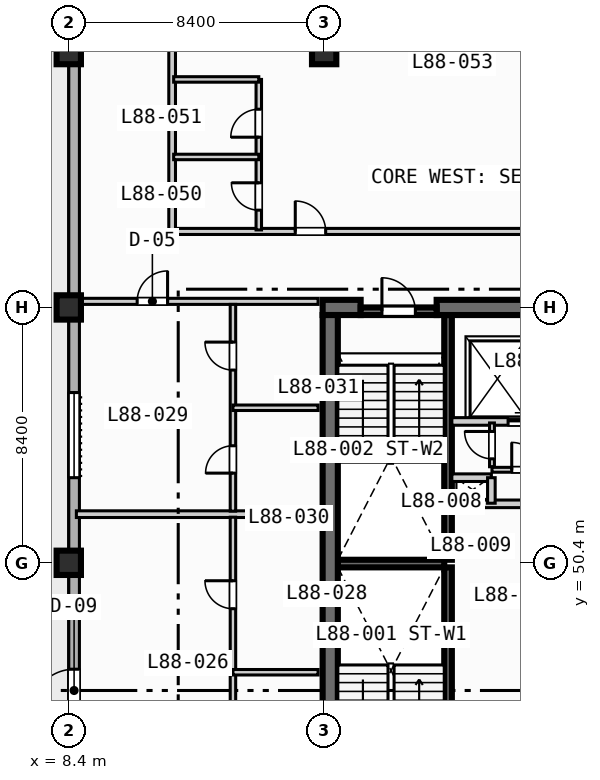
"""IFC4 building model, lengths in metres.
Left out: names, types, materials, properties, quantities, classifications, styles, units other than length and angle.
Written with IfcOpenShell. Run it as: python <this file> out.ifc"""

import sys

from ifc_helpers import new_model, si_unit, direction, frame, frame_2d, origin, origin_2d, place, context, subcontext, project, spatial, rectangle, extrude, element, fill, save


model = new_model("IFC4")
c1 = context("Model", 3, precision=1e-05, world=origin(), true_north=direction((0.0, 1.0)))
c2 = subcontext(c1, "Body", "Model", "MODEL_VIEW")
j1 = project(units=[si_unit("LENGTHUNIT", "METRE"), si_unit("PLANEANGLEUNIT", "RADIAN")], contexts=[c1])
p1 = place(None, origin())
s1 = spatial("IfcSite", under=j1, at=p1, CompositionType="ELEMENT")
p2 = place(p1, origin())
s2 = spatial("IfcBuilding", under=s1, at=p2, CompositionType="ELEMENT")
p3 = place(p2, frame((0.0, 0.0, 355.4)))
s3 = spatial("IfcBuildingStorey", under=s2, at=p3, CompositionType="ELEMENT", Elevation=355.4)
for number, where, z_axis, x_axis in (
    (1, (20.875, 42.2, 0.0), (0.0, 0.0, 1.0), (0.0, 1.0, 0.0)),
    (2, (20.875, 50.5, 0.0), (0.0, 0.0, 1.0), (0.0, 1.0, 0.0)),
):
    element("IfcWall", number, at=place(p3, frame(where, z_axis=z_axis, x_axis=x_axis)), inside=s3, PredefinedType="SOLIDWALL", context=c2, shape_type="SweptSolid", body=[
        extrude(rectangle(XDim=8.05, YDim=0.25, at=frame_2d((4.025, 0.0))), origin(), (0.0, 0.0, 1.0), 3.97),
    ])
p4 = place(p3, frame((17.25, 50.375, 0.0), z_axis=(0.0, 0.0, 1.0), x_axis=(1.0, 0.0, 0.0)))
e3 = element("IfcWall", 3, at=p4, inside=s3, PredefinedType="SOLIDWALL", context=c2, shape_type="SweptSolid", body=[
    extrude(rectangle(XDim=3.5, YDim=0.25, at=frame_2d((1.75, 0.0))), origin(), (0.0, 0.0, 1.0), 3.97),
])
p5 = place(p3, frame((16.75, 58.8, 0.0), z_axis=(0.0, 0.0, 1.0), x_axis=(1.0, 0.0, 0.0)))
e4 = element("IfcWall", 4, at=p5, inside=s3, PredefinedType="SHEAR", context=c2, shape_type="SweptSolid", body=[
    extrude(rectangle(XDim=1.25, YDim=0.5, at=frame_2d((0.625, 0.0))), origin(), (0.0, 0.0, 1.0), 3.97),
])
p6 = place(p3, frame((20.5, 58.8, 0.0), z_axis=(0.0, 0.0, 1.0), x_axis=(1.0, 0.0, 0.0)))
e5 = element("IfcWall", 5, at=p6, inside=s3, PredefinedType="SHEAR", context=c2, shape_type="SweptSolid", body=[
    extrude(rectangle(XDim=4.95, YDim=0.5, at=frame_2d((2.475, 0.0))), origin(), (0.0, 0.0, 1.0), 3.97),
])
p7 = place(p3, frame((17.0, 42.2, 0.0), z_axis=(0.0, 0.0, 1.0), x_axis=(0.0, 1.0, 0.0)))
e6 = element("IfcWall", 6, at=p7, inside=s3, PredefinedType="SHEAR", context=c2, shape_type="SweptSolid", body=[
    extrude(rectangle(XDim=16.35, YDim=0.5, at=frame_2d((8.175, 0.0))), origin(), (0.0, 0.0, 1.0), 3.97),
])
for number, where, z_axis, x_axis in (
    (7, (8.4, 50.4, 0.0), (0.0, 0.0, 1.0), (1.0, 0.0, 0.0)),
    (8, (8.4, 58.8, 0.0), (0.0, 0.0, 1.0), (1.0, 0.0, 0.0)),
    (9, (8.4, 67.2, 0.0), (0.0, 0.0, 1.0), (1.0, 0.0, 0.0)),
    (10, (16.8, 67.2, 0.0), (0.0, 0.0, 1.0), (1.0, 0.0, 0.0)),
):
    element("IfcColumn", number, at=place(p3, frame(where, z_axis=z_axis, x_axis=x_axis)), inside=s3, PredefinedType="COLUMN", context=c2, shape_type="SweptSolid", body=[
        extrude(rectangle(XDim=0.8, YDim=0.8, at=origin_2d()), origin(), (0.0, 0.0, 1.0), 4.2),
    ])
p8 = place(p3, frame((8.575, 11.575, 0.0), z_axis=(0.0, 0.0, 1.0), x_axis=(0.0, 1.0, 0.0)))
e11 = element("IfcWall", 11, at=p8, inside=s3, PredefinedType="STANDARD", context=c2, shape_type="SweptSolid", body=[
    extrude(rectangle(XDim=60.85, YDim=0.35, at=frame_2d((30.425, 0.0))), origin(), (0.0, 0.0, 1.0), 3.97),
])
p9 = place(p8, frame((33.925, 0.0, 0.0)))
e12 = element("IfcOpeningElement", 12, at=p9, cuts=e11, PredefinedType="OPENING", context=c2, shape_type="SweptSolid", body=[
    extrude(rectangle(XDim=1.4, YDim=2.2, at=frame_2d((0.7, 1.1))), frame((0.0, 0.185, 0.0), z_axis=(0.0, -1.0, 0.0), x_axis=(1.0, 0.0, 0.0)), (0.0, 0.0, 1.0), 0.37),
])
p10 = place(p8, frame((24.825, 0.0, 0.85)))
e13 = element("IfcOpeningElement", 13, at=p10, cuts=e11, PredefinedType="OPENING", context=c2, shape_type="SweptSolid", body=[
    extrude(rectangle(XDim=2.8, YDim=2.1, at=frame_2d((1.4, 1.05))), frame((0.0, 0.185, 0.0), z_axis=(0.0, -1.0, 0.0), x_axis=(1.0, 0.0, 0.0)), (0.0, 0.0, 1.0), 0.37),
])
p11 = place(p8, frame((41.625, 0.0, 0.85)))
e14 = element("IfcOpeningElement", 14, at=p11, cuts=e11, PredefinedType="OPENING", context=c2, shape_type="SweptSolid", body=[
    extrude(rectangle(XDim=2.8, YDim=2.1, at=frame_2d((1.4, 1.05))), frame((0.0, 0.185, 0.0), z_axis=(0.0, -1.0, 0.0), x_axis=(1.0, 0.0, 0.0)), (0.0, 0.0, 1.0), 0.37),
])
p12 = place(p8, frame((19.25, 0.0, 0.85)))
e15 = element("IfcOpeningElement", 15, at=p12, cuts=e11, PredefinedType="OPENING", context=c2, shape_type="SweptSolid", body=[
    extrude(rectangle(XDim=1.8, YDim=1.8, at=frame_2d((0.9, 0.9))), frame((0.0, 0.185, 0.0), z_axis=(0.0, -1.0, 0.0), x_axis=(1.0, 0.0, 0.0)), (0.0, 0.0, 1.0), 0.37),
])
p13 = place(p3, frame((18.0, 58.675, 0.0), z_axis=(0.0, 0.0, 1.0), x_axis=(1.0, 0.0, 0.0)))
e16 = element("IfcWall", 16, at=p13, inside=s3, PredefinedType="SOLIDWALL", context=c2, shape_type="SweptSolid", body=[
    extrude(rectangle(XDim=2.5, YDim=0.25, at=frame_2d((1.25, 0.0))), origin(), (0.0, 0.0, 1.0), 3.97),
])
p14 = place(p13, frame((0.7, 0.0, 0.0)))
e17 = element("IfcOpeningElement", 17, at=p14, cuts=e16, PredefinedType="OPENING", context=c2, shape_type="SweptSolid", body=[
    extrude(rectangle(XDim=1.1, YDim=2.15, at=frame_2d((0.55, 1.075))), frame((0.0, 0.135, 0.0), z_axis=(0.0, -1.0, 0.0), x_axis=(1.0, 0.0, 0.0)), (0.0, 0.0, 1.0), 0.27),
])
p15 = place(p3, frame((21.0, 52.34, 0.0), z_axis=(0.0, 0.0, 1.0), x_axis=(1.0, 0.0, 0.0)))
e18 = element("IfcWall", 18, at=p15, inside=s3, PredefinedType="SOLIDWALL", context=c2, shape_type="SweptSolid", body=[
    extrude(rectangle(XDim=3.95, YDim=0.25, at=frame_2d((1.975, 0.0))), origin(), (0.0, 0.0, 1.0), 3.97),
])
p16 = place(p3, frame((21.0, 55.05, 0.0), z_axis=(0.0, 0.0, 1.0), x_axis=(1.0, 0.0, 0.0)))
e19 = element("IfcWall", 19, at=p16, inside=s3, PredefinedType="SOLIDWALL", context=c2, shape_type="SweptSolid", body=[
    extrude(rectangle(XDim=4.15, YDim=0.25, at=frame_2d((2.075, 0.0))), origin(), (0.0, 0.0, 1.0), 3.97),
])
p17 = place(p16, frame((1.85, 0.0, 0.0)))
e20 = element("IfcOpeningElement", 20, at=p17, cuts=e19, PredefinedType="OPENING", context=c2, shape_type="SweptSolid", body=[
    extrude(rectangle(XDim=1.1, YDim=2.15, at=frame_2d((0.55, 1.075))), frame((0.0, 0.135, 0.0), z_axis=(0.0, -1.0, 0.0), x_axis=(1.0, 0.0, 0.0)), (0.0, 0.0, 1.0), 0.27),
])
p18 = place(p3, frame((21.0, 53.2, 0.0), z_axis=(0.0, 0.0, 1.0), x_axis=(1.0, 0.0, 0.0)))
e21 = element("IfcWall", 21, at=p18, inside=s3, PredefinedType="SOLIDWALL", context=c2, shape_type="SweptSolid", body=[
    extrude(rectangle(XDim=1.3, YDim=0.25, at=frame_2d((0.65, 0.0))), origin(), (0.0, 0.0, 1.0), 3.97),
])
p19 = place(p3, frame((22.3, 52.36, 0.0), z_axis=(0.0, 0.0, 1.0), x_axis=(0.0, 1.0, 0.0)))
e22 = element("IfcWall", 22, at=p19, inside=s3, PredefinedType="SOLIDWALL", context=c2, shape_type="SweptSolid", body=[
    extrude(rectangle(XDim=0.84, YDim=0.25, at=frame_2d((0.42, 0.0))), origin(), (0.0, 0.0, 1.0), 3.97),
])
p20 = place(p3, frame((22.32, 53.56, 0.0), z_axis=(0.0, 0.0, 1.0), x_axis=(0.0, 1.0, 0.0)))
e23 = element("IfcWall", 23, at=p20, inside=s3, PredefinedType="PARTITIONING", context=c2, shape_type="SweptSolid", body=[
    extrude(rectangle(XDim=1.44, YDim=0.16, at=frame_2d((0.72, 0.0))), origin(), (0.0, 0.0, 1.0), 3.97),
])
p21 = place(p20, frame((0.26, 0.0, 0.0)))
e24 = element("IfcOpeningElement", 24, at=p21, cuts=e23, PredefinedType="OPENING", context=c2, shape_type="SweptSolid", body=[
    extrude(rectangle(XDim=0.9, YDim=2.1, at=frame_2d((0.45, 1.05))), frame((0.0, 0.09, 0.0), z_axis=(0.0, -1.0, 0.0), x_axis=(1.0, 0.0, 0.0)), (0.0, 0.0, 1.0), 0.18),
])
p22 = place(p3, frame((22.32, 53.46, 0.0), z_axis=(0.0, 0.0, 1.0), x_axis=(1.0, 0.0, 0.0)))
e25 = element("IfcWall", 25, at=p22, inside=s3, PredefinedType="PARTITIONING", context=c2, shape_type="SweptSolid", body=[
    extrude(rectangle(XDim=2.4, YDim=0.16, at=frame_2d((1.2, 0.0))), origin(), (0.0, 0.0, 1.0), 3.97),
])
p23 = place(p22, frame((0.65, 0.0, 0.0)))
e26 = element("IfcOpeningElement", 26, at=p23, cuts=e25, PredefinedType="OPENING", context=c2, shape_type="SweptSolid", body=[
    extrude(rectangle(XDim=0.9, YDim=2.1, at=frame_2d((0.45, 1.05))), frame((0.0, 0.09, 0.0), z_axis=(0.0, -1.0, 0.0), x_axis=(1.0, 0.0, 0.0)), (0.0, 0.0, 1.0), 0.18),
])
p24 = place(p3, frame((8.65, 59.0, 0.0), z_axis=(0.0, 0.0, 1.0), x_axis=(1.0, 0.0, 0.0)))
e27 = element("IfcWall", 27, at=p24, inside=s3, PredefinedType="PARTITIONING", context=c2, shape_type="SweptSolid", body=[
    extrude(rectangle(XDim=7.95, YDim=0.2, at=frame_2d((3.975, 0.0))), origin(), (0.0, 0.0, 1.0), 3.37),
])
p25 = place(p24, frame((2.0, 0.0, 0.0)))
e28 = element("IfcOpeningElement", 28, at=p25, cuts=e27, PredefinedType="OPENING", context=c2, shape_type="SweptSolid", body=[
    extrude(rectangle(XDim=1.0, YDim=2.15, at=frame_2d((0.5, 1.075))), frame((0.0, 0.11, 0.0), z_axis=(0.0, -1.0, 0.0), x_axis=(1.0, 0.0, 0.0)), (0.0, 0.0, 1.0), 0.22),
])
p26 = place(p3, frame((8.65, 52.0, 0.0), z_axis=(0.0, 0.0, 1.0), x_axis=(1.0, 0.0, 0.0)))
e29 = element("IfcWall", 29, at=p26, inside=s3, PredefinedType="PARTITIONING", context=c2, shape_type="SweptSolid", body=[
    extrude(rectangle(XDim=7.95, YDim=0.22, at=frame_2d((3.975, 0.0))), origin(), (0.0, 0.0, 1.0), 3.97),
])
p27 = place(p3, frame((13.8, 41.7, 0.0), z_axis=(0.0, 0.0, 1.0), x_axis=(0.0, 1.0, 0.0)))
e30 = element("IfcWall", 30, at=p27, inside=s3, PredefinedType="PLUMBINGWALL", context=c2, shape_type="SweptSolid", body=[
    extrude(rectangle(XDim=10.2, YDim=0.18, at=frame_2d((5.1, 0.0))), origin(), (0.0, 0.0, 1.0), 3.97),
])
p28 = place(p27, frame((2.1, 0.0, 0.0)))
e31 = element("IfcOpeningElement", 31, at=p28, cuts=e30, PredefinedType="OPENING", context=c2, shape_type="SweptSolid", body=[
    extrude(rectangle(XDim=0.9, YDim=2.1, at=frame_2d((0.45, 1.05))), frame((0.0, 0.1, 0.0), z_axis=(0.0, -1.0, 0.0), x_axis=(1.0, 0.0, 0.0)), (0.0, 0.0, 1.0), 0.2),
])
p29 = place(p27, frame((7.19, 0.0, 0.0)))
e32 = element("IfcOpeningElement", 32, at=p29, cuts=e30, PredefinedType="OPENING", context=c2, shape_type="SweptSolid", body=[
    extrude(rectangle(XDim=0.92, YDim=2.1, at=frame_2d((0.46, 1.05))), frame((0.0, 0.1, 0.0), z_axis=(0.0, -1.0, 0.0), x_axis=(1.0, 0.0, 0.0)), (0.0, 0.0, 1.0), 0.2),
])
p30 = place(p3, frame((13.8, 46.8, 0.0), z_axis=(0.0, 0.0, 1.0), x_axis=(1.0, 0.0, 0.0)))
e33 = element("IfcWall", 33, at=p30, inside=s3, PredefinedType="PLUMBINGWALL", context=c2, shape_type="SweptSolid", body=[
    extrude(rectangle(XDim=2.8, YDim=0.18, at=frame_2d((1.4, 0.0))), origin(), (0.0, 0.0, 1.0), 3.97),
])
p31 = place(p3, frame((13.8, 52.1, 0.0), z_axis=(0.0, 0.0, 1.0), x_axis=(0.0, 1.0, 0.0)))
e34 = element("IfcWall", 34, at=p31, inside=s3, PredefinedType="PLUMBINGWALL", context=c2, shape_type="SweptSolid", body=[
    extrude(rectangle(XDim=6.8, YDim=0.18, at=frame_2d((3.4, 0.0))), origin(), (0.0, 0.0, 1.0), 3.97),
])
p32 = place(p31, frame((1.25, 0.0, 0.0)))
e35 = element("IfcOpeningElement", 35, at=p32, cuts=e34, PredefinedType="OPENING", context=c2, shape_type="SweptSolid", body=[
    extrude(rectangle(XDim=0.9, YDim=2.1, at=frame_2d((0.45, 1.05))), frame((0.0, 0.1, 0.0), z_axis=(0.0, -1.0, 0.0), x_axis=(1.0, 0.0, 0.0)), (0.0, 0.0, 1.0), 0.2),
])
p33 = place(p31, frame((4.64, 0.0, 0.0)))
e36 = element("IfcOpeningElement", 36, at=p33, cuts=e34, PredefinedType="OPENING", context=c2, shape_type="SweptSolid", body=[
    extrude(rectangle(XDim=0.92, YDim=2.1, at=frame_2d((0.46, 1.05))), frame((0.0, 0.1, 0.0), z_axis=(0.0, -1.0, 0.0), x_axis=(1.0, 0.0, 0.0)), (0.0, 0.0, 1.0), 0.2),
])
p34 = place(p3, frame((13.8, 55.5, 0.0), z_axis=(0.0, 0.0, 1.0), x_axis=(1.0, 0.0, 0.0)))
e37 = element("IfcWall", 37, at=p34, inside=s3, PredefinedType="PLUMBINGWALL", context=c2, shape_type="SweptSolid", body=[
    extrude(rectangle(XDim=2.8, YDim=0.18, at=frame_2d((1.4, 0.0))), origin(), (0.0, 0.0, 1.0), 3.97),
])
p35 = place(p3, frame((11.8, 61.3, 0.0), z_axis=(0.0, 0.0, 1.0), x_axis=(1.0, 0.0, 0.0)))
e38 = element("IfcWall", 38, at=p35, inside=s3, PredefinedType="PARTITIONING", context=c2, shape_type="SweptSolid", body=[
    extrude(rectangle(XDim=21.35, YDim=0.2, at=frame_2d((10.675, 0.0))), origin(), (0.0, 0.0, 1.0), 3.97),
])
p36 = place(p35, frame((4.05, 0.0, 0.0)))
e39 = element("IfcOpeningElement", 39, at=p36, cuts=e38, PredefinedType="OPENING", context=c2, shape_type="SweptSolid", body=[
    extrude(rectangle(XDim=1.0, YDim=2.15, at=frame_2d((0.5, 1.075))), frame((0.0, 0.11, 0.0), z_axis=(0.0, -1.0, 0.0), x_axis=(1.0, 0.0, 0.0)), (0.0, 0.0, 1.0), 0.22),
])
p37 = place(p3, frame((11.8, 61.3, 0.0), z_axis=(0.0, 0.0, 1.0), x_axis=(0.0, 1.0, 0.0)))
e40 = element("IfcWall", 40, at=p37, inside=s3, PredefinedType="PARTITIONING", context=c2, shape_type="SweptSolid", body=[
    extrude(rectangle(XDim=11.1, YDim=0.22, at=frame_2d((5.55, 0.0))), origin(), (0.0, 0.0, 1.0), 3.97),
])
p38 = place(p3, frame((14.65, 61.35, 0.0), z_axis=(0.0, 0.0, 1.0), x_axis=(0.0, 1.0, 0.0)))
e41 = element("IfcWall", 41, at=p38, inside=s3, PredefinedType="PLUMBINGWALL", context=c2, shape_type="SweptSolid", body=[
    extrude(rectangle(XDim=4.95, YDim=0.18, at=frame_2d((2.475, 0.0))), origin(), (0.0, 0.0, 1.0), 3.97),
])
p39 = place(p38, frame((0.65, 0.0, 0.0)))
e42 = element("IfcOpeningElement", 42, at=p39, cuts=e41, PredefinedType="OPENING", context=c2, shape_type="SweptSolid", body=[
    extrude(rectangle(XDim=0.9, YDim=2.1, at=frame_2d((0.45, 1.05))), frame((0.0, 0.1, 0.0), z_axis=(0.0, -1.0, 0.0), x_axis=(1.0, 0.0, 0.0)), (0.0, 0.0, 1.0), 0.2),
])
p40 = place(p38, frame((3.05, 0.0, 0.0)))
e43 = element("IfcOpeningElement", 43, at=p40, cuts=e41, PredefinedType="OPENING", context=c2, shape_type="SweptSolid", body=[
    extrude(rectangle(XDim=0.92, YDim=2.1, at=frame_2d((0.46, 1.05))), frame((0.0, 0.1, 0.0), z_axis=(0.0, -1.0, 0.0), x_axis=(1.0, 0.0, 0.0)), (0.0, 0.0, 1.0), 0.2),
])
for number, where, z_axis, x_axis in (
    (44, (11.85, 63.75, 0.0), (0.0, 0.0, 1.0), (1.0, 0.0, 0.0)),
    (45, (11.85, 66.3, 0.0), (0.0, 0.0, 1.0), (1.0, 0.0, 0.0)),
):
    element("IfcWall", number, at=place(p3, frame(where, z_axis=z_axis, x_axis=x_axis)), inside=s3, PredefinedType="PLUMBINGWALL", context=c2, shape_type="SweptSolid", body=[
        extrude(rectangle(XDim=2.8, YDim=0.18, at=frame_2d((1.4, 0.0))), origin(), (0.0, 0.0, 1.0), 3.97),
    ])
p41 = place(p9, origin())
e46 = element("IfcDoor", 46, at=p41, inside=s3, OperationType="SINGLE_SWING_LEFT", PredefinedType="DOOR", context=c2, shape_type="SweptSolid", body=[
    extrude(rectangle(XDim=1.4, YDim=2.2, at=frame_2d((0.7, 1.1))), frame((0.0, 0.025, 0.0), z_axis=(0.0, -1.0, 0.0), x_axis=(1.0, 0.0, 0.0)), (0.0, 0.0, 1.0), 0.05),
])
fill(e12, e46)
p42 = place(p11, origin())
e47 = element("IfcWindow", 47, at=p42, inside=s3, PartitioningType="SINGLE_PANEL", PredefinedType="WINDOW", context=c2, shape_type="SweptSolid", body=[
    extrude(rectangle(XDim=2.8, YDim=2.1, at=frame_2d((1.4, 1.05))), frame((0.0, 0.03, 0.0), z_axis=(0.0, -1.0, 0.0), x_axis=(1.0, 0.0, 0.0)), (0.0, 0.0, 1.0), 0.06),
])
fill(e14, e47)
p43 = place(p14, origin())
e48 = element("IfcDoor", 48, at=p43, inside=s3, OperationType="SINGLE_SWING_LEFT", PredefinedType="DOOR", context=c2, shape_type="SweptSolid", body=[
    extrude(rectangle(XDim=1.1, YDim=2.15, at=frame_2d((0.55, 1.075))), frame((0.0, 0.025, 0.0), z_axis=(0.0, -1.0, 0.0), x_axis=(1.0, 0.0, 0.0)), (0.0, 0.0, 1.0), 0.05),
])
fill(e17, e48)
p44 = place(p17, origin())
e49 = element("IfcDoor", 49, at=p44, inside=s3, OperationType="SLIDING_TO_LEFT", PredefinedType="DOOR", context=c2, shape_type="SweptSolid", body=[
    extrude(rectangle(XDim=1.1, YDim=2.15, at=frame_2d((0.55, 1.075))), frame((0.0, 0.025, 0.0), z_axis=(0.0, -1.0, 0.0), x_axis=(1.0, 0.0, 0.0)), (0.0, 0.0, 1.0), 0.05),
])
fill(e20, e49)
p45 = place(p21, origin())
e50 = element("IfcDoor", 50, at=p45, inside=s3, OperationType="SINGLE_SWING_RIGHT", PredefinedType="DOOR", context=c2, shape_type="SweptSolid", body=[
    extrude(rectangle(XDim=0.9, YDim=2.1, at=frame_2d((0.45, 1.05))), frame((0.0, 0.025, 0.0), z_axis=(0.0, -1.0, 0.0), x_axis=(1.0, 0.0, 0.0)), (0.0, 0.0, 1.0), 0.05),
])
fill(e24, e50)
p46 = place(p23, origin())
e51 = element("IfcDoor", 51, at=p46, inside=s3, OperationType="SINGLE_SWING_LEFT", PredefinedType="DOOR", context=c2, shape_type="SweptSolid", body=[
    extrude(rectangle(XDim=0.9, YDim=2.1, at=frame_2d((0.45, 1.05))), frame((0.0, 0.025, 0.0), z_axis=(0.0, -1.0, 0.0), x_axis=(1.0, 0.0, 0.0)), (0.0, 0.0, 1.0), 0.05),
])
fill(e26, e51)
p47 = place(p25, origin())
e52 = element("IfcDoor", 52, at=p47, inside=s3, OperationType="SINGLE_SWING_RIGHT", PredefinedType="DOOR", context=c2, shape_type="SweptSolid", body=[
    extrude(rectangle(XDim=1.0, YDim=2.15, at=frame_2d((0.5, 1.075))), frame((0.0, 0.025, 0.0), z_axis=(0.0, -1.0, 0.0), x_axis=(1.0, 0.0, 0.0)), (0.0, 0.0, 1.0), 0.05),
])
fill(e28, e52)
p48 = place(p29, origin())
e53 = element("IfcDoor", 53, at=p48, inside=s3, OperationType="SINGLE_SWING_RIGHT", PredefinedType="DOOR", context=c2, shape_type="SweptSolid", body=[
    extrude(rectangle(XDim=0.92, YDim=2.1, at=frame_2d((0.46, 1.05))), frame((0.0, 0.025, 0.0), z_axis=(0.0, -1.0, 0.0), x_axis=(1.0, 0.0, 0.0)), (0.0, 0.0, 1.0), 0.05),
])
fill(e32, e53)
p49 = place(p32, origin())
e54 = element("IfcDoor", 54, at=p49, inside=s3, OperationType="SINGLE_SWING_LEFT", PredefinedType="DOOR", context=c2, shape_type="SweptSolid", body=[
    extrude(rectangle(XDim=0.9, YDim=2.1, at=frame_2d((0.45, 1.05))), frame((0.0, 0.025, 0.0), z_axis=(0.0, -1.0, 0.0), x_axis=(1.0, 0.0, 0.0)), (0.0, 0.0, 1.0), 0.05),
])
fill(e35, e54)
p50 = place(p33, origin())
e55 = element("IfcDoor", 55, at=p50, inside=s3, OperationType="SINGLE_SWING_RIGHT", PredefinedType="DOOR", context=c2, shape_type="SweptSolid", body=[
    extrude(rectangle(XDim=0.92, YDim=2.1, at=frame_2d((0.46, 1.05))), frame((0.0, 0.025, 0.0), z_axis=(0.0, -1.0, 0.0), x_axis=(1.0, 0.0, 0.0)), (0.0, 0.0, 1.0), 0.05),
])
fill(e36, e55)
p51 = place(p36, origin())
e56 = element("IfcDoor", 56, at=p51, inside=s3, OperationType="SINGLE_SWING_LEFT", PredefinedType="DOOR", context=c2, shape_type="SweptSolid", body=[
    extrude(rectangle(XDim=1.0, YDim=2.15, at=frame_2d((0.5, 1.075))), frame((0.0, 0.025, 0.0), z_axis=(0.0, -1.0, 0.0), x_axis=(1.0, 0.0, 0.0)), (0.0, 0.0, 1.0), 0.05),
])
fill(e39, e56)
p52 = place(p39, origin())
e57 = element("IfcDoor", 57, at=p52, inside=s3, OperationType="SINGLE_SWING_RIGHT", PredefinedType="DOOR", context=c2, shape_type="SweptSolid", body=[
    extrude(rectangle(XDim=0.9, YDim=2.1, at=frame_2d((0.45, 1.05))), frame((0.0, 0.025, 0.0), z_axis=(0.0, -1.0, 0.0), x_axis=(1.0, 0.0, 0.0)), (0.0, 0.0, 1.0), 0.05),
])
fill(e42, e57)
p53 = place(p40, origin())
e58 = element("IfcDoor", 58, at=p53, inside=s3, OperationType="SINGLE_SWING_LEFT", PredefinedType="DOOR", context=c2, shape_type="SweptSolid", body=[
    extrude(rectangle(XDim=0.92, YDim=2.1, at=frame_2d((0.46, 1.05))), frame((0.0, 0.025, 0.0), z_axis=(0.0, -1.0, 0.0), x_axis=(1.0, 0.0, 0.0)), (0.0, 0.0, 1.0), 0.05),
])
fill(e43, e58)
save(model, sys.argv[1])
